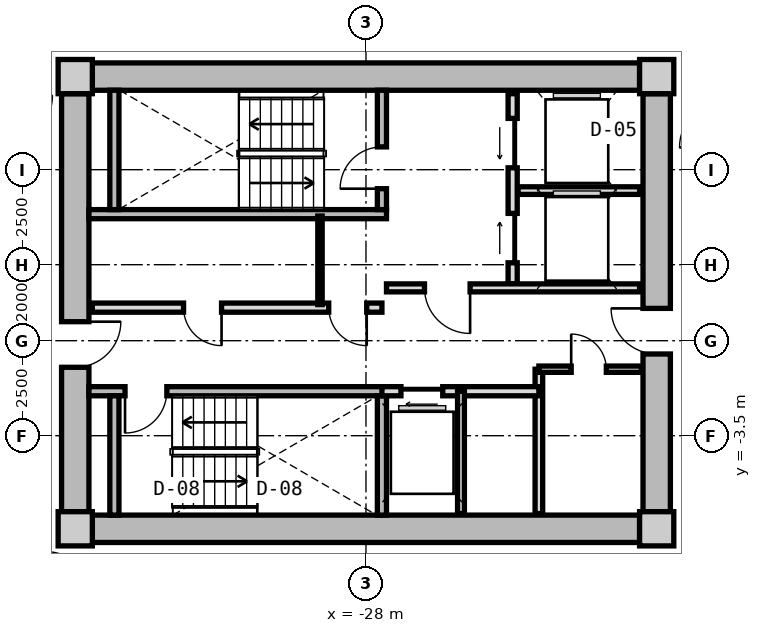
"""IFC4 building model, lengths in metres.
Left out: names, types, materials, properties, quantities, classifications, styles, units other than length and angle.
Written with IfcOpenShell. Run it as: python <this file> out.ifc"""

import sys

from ifc_helpers import new_model, si_unit, direction, frame, frame_2d, origin, origin_2d, place, context, subcontext, project, spatial, rectangle, extrude, source, transform, mapped, element, fill, save


model = new_model("IFC4")
c1 = context("Model", 3, precision=1e-05, world=origin(), true_north=direction((0.0, 1.0)))
c2 = subcontext(c1, "Body", "Model", "MODEL_VIEW")
j1 = project(units=[si_unit("LENGTHUNIT", "METRE"), si_unit("PLANEANGLEUNIT", "RADIAN")], contexts=[c1])
p1 = place(None, origin())
s1 = spatial("IfcSite", under=j1, at=p1, CompositionType="ELEMENT")
p2 = place(p1, origin())
s2 = spatial("IfcBuilding", under=s1, at=p2, CompositionType="ELEMENT")
p3 = place(p2, frame((0.0, 0.0, 102.35)))
s3 = spatial("IfcBuildingStorey", under=s2, at=p3, CompositionType="ELEMENT", Elevation=102.35)
m1 = source(origin(), c2, "Body", "SweptSolid", [
    extrude(rectangle(XDim=0.9, YDim=0.9, at=origin_2d()), origin(), (0.0, 0.0, 1.0), 3.05),
])
for number, where, z_axis, x_axis in (
    (1, (-35.65, -5.95, 0.0), (0.0, 0.0, 1.0), (1.0, 0.0, 0.0)),
    (2, (-20.35, -5.95, 0.0), (0.0, 0.0, 1.0), (1.0, 0.0, 0.0)),
    (3, (-20.35, 5.95, 0.0), (0.0, 0.0, 1.0), (1.0, 0.0, 0.0)),
    (4, (-35.65, 5.95, 0.0), (0.0, 0.0, 1.0), (1.0, 0.0, 0.0)),
):
    element("IfcColumn", number, at=place(p3, frame(where, z_axis=z_axis, x_axis=x_axis)), inside=s3, PredefinedType="COLUMN", context=c2, shape_type="MappedRepresentation", body=[
        mapped(m1, transform((0.0, 0.0, 0.0), x_axis=(1.0, 0.0, 0.0), y_axis=(0.0, 1.0, 0.0), z_axis=(0.0, 0.0, 1.0), scale=1.0)),
    ])
m2 = source(origin(), c2, "Body", "SweptSolid", [
    extrude(rectangle(XDim=14.4, YDim=0.72, at=frame_2d((7.2, 0.0))), origin(), (0.0, 0.0, 1.0), 2.79),
])
for number, where, z_axis, x_axis in (
    (5, (-35.2, 5.95, 0.0), (0.0, 0.0, 1.0), (1.0, 0.0, 0.0)),
    (6, (-20.8, -5.95, 0.0), (0.0, 0.0, 1.0), (-1.0, 0.0, 0.0)),
):
    element("IfcWall", number, at=place(p3, frame(where, z_axis=z_axis, x_axis=x_axis)), inside=s3, PredefinedType="SHEAR", context=c2, shape_type="MappedRepresentation", body=[
        mapped(m2, transform((0.0, 0.0, 0.0), x_axis=(1.0, 0.0, 0.0), y_axis=(0.0, 1.0, 0.0), z_axis=(0.0, 0.0, 1.0), scale=1.0)),
    ])
m3 = source(origin(), c2, "Body", "SweptSolid", [
    extrude(rectangle(XDim=11.0, YDim=0.72, at=frame_2d((5.5, 0.0))), origin(), (0.0, 0.0, 1.0), 2.79),
])
p4 = place(p3, frame((-35.65, -5.5, 0.0), z_axis=(0.0, 0.0, 1.0), x_axis=(0.0, 1.0, 0.0)))
e7 = element("IfcWall", 7, at=p4, inside=s3, PredefinedType="SHEAR", context=c2, shape_type="MappedRepresentation", body=[
    mapped(m3, transform((0.0, 0.0, 0.0), x_axis=(1.0, 0.0, 0.0), y_axis=(0.0, 1.0, 0.0), z_axis=(0.0, 0.0, 1.0), scale=1.0)),
])
p5 = place(p4, frame((3.8, 0.0, 0.0)))
e8 = element("IfcOpeningElement", 8, at=p5, cuts=e7, PredefinedType="OPENING", context=c2, shape_type="SweptSolid", body=[
    extrude(rectangle(XDim=1.2, YDim=2.15, at=frame_2d((0.6, 1.075))), frame((0.0, 0.37, 0.0), z_axis=(0.0, -1.0, 0.0), x_axis=(1.0, 0.0, 0.0)), (0.0, 0.0, 1.0), 0.74),
])
p6 = place(p3, frame((-20.35, 5.5, 0.0), z_axis=(0.0, 0.0, 1.0), x_axis=(0.0, -1.0, 0.0)))
e9 = element("IfcWall", 9, at=p6, inside=s3, PredefinedType="SHEAR", context=c2, shape_type="MappedRepresentation", body=[
    mapped(m3, transform((0.0, 0.0, 0.0), x_axis=(1.0, 0.0, 0.0), y_axis=(0.0, 1.0, 0.0), z_axis=(0.0, 0.0, 1.0), scale=1.0)),
])
p7 = place(p6, frame((5.65, 0.0, 0.0)))
e10 = element("IfcOpeningElement", 10, at=p7, cuts=e9, PredefinedType="OPENING", context=c2, shape_type="SweptSolid", body=[
    extrude(rectangle(XDim=1.2, YDim=2.15, at=frame_2d((0.6, 1.075))), frame((0.0, 0.37, 0.0), z_axis=(0.0, -1.0, 0.0), x_axis=(1.0, 0.0, 0.0)), (0.0, 0.0, 1.0), 0.74),
])
m4 = source(origin(), c2, "Body", "SweptSolid", [
    extrude(rectangle(XDim=7.83, YDim=0.24, at=frame_2d((3.915, 0.0))), origin(), (0.0, 0.0, 1.0), 2.79),
])
p8 = place(p3, frame((-35.29, 2.33, 0.0), z_axis=(0.0, 0.0, 1.0), x_axis=(1.0, 0.0, 0.0)))
e11 = element("IfcWall", 11, at=p8, inside=s3, PredefinedType="PARTITIONING", context=c2, shape_type="MappedRepresentation", body=[
    mapped(m4, transform((0.0, 0.0, 0.0), x_axis=(1.0, 0.0, 0.0), y_axis=(0.0, 1.0, 0.0), z_axis=(0.0, 0.0, 1.0), scale=1.0)),
])
m5 = source(origin(), c2, "Body", "SweptSolid", [
    extrude(rectangle(XDim=3.14, YDim=0.24, at=frame_2d((1.57, 0.0))), origin(), (0.0, 0.0, 1.0), 2.79),
])
p9 = place(p3, frame((-34.62, 2.45, 0.0), z_axis=(0.0, 0.0, 1.0), x_axis=(0.0, 1.0, 0.0)))
e12 = element("IfcWall", 12, at=p9, inside=s3, PredefinedType="PARTITIONING", context=c2, shape_type="MappedRepresentation", body=[
    mapped(m5, transform((0.0, 0.0, 0.0), x_axis=(1.0, 0.0, 0.0), y_axis=(0.0, 1.0, 0.0), z_axis=(0.0, 0.0, 1.0), scale=1.0)),
])
p10 = place(p3, frame((-27.58, 2.45, 0.0), z_axis=(0.0, 0.0, 1.0), x_axis=(0.0, 1.0, 0.0)))
e13 = element("IfcWall", 13, at=p10, inside=s3, PredefinedType="PARTITIONING", context=c2, shape_type="MappedRepresentation", body=[
    mapped(m5, transform((0.0, 0.0, 0.0), x_axis=(1.0, 0.0, 0.0), y_axis=(0.0, 1.0, 0.0), z_axis=(0.0, 0.0, 1.0), scale=1.0)),
])
p11 = place(p10, frame((0.55, 0.0, 0.0)))
e14 = element("IfcOpeningElement", 14, at=p11, cuts=e13, PredefinedType="OPENING", context=c2, shape_type="SweptSolid", body=[
    extrude(rectangle(XDim=1.1, YDim=2.15, at=frame_2d((0.55, 1.075))), frame((0.0, 0.13, 0.0), z_axis=(0.0, -1.0, 0.0), x_axis=(1.0, 0.0, 0.0)), (0.0, 0.0, 1.0), 0.26),
])
p12 = place(p3, frame((-35.29, -2.33, 0.0), z_axis=(0.0, 0.0, 1.0), x_axis=(1.0, 0.0, 0.0)))
e15 = element("IfcWall", 15, at=p12, inside=s3, PredefinedType="PARTITIONING", context=c2, shape_type="MappedRepresentation", body=[
    mapped(m4, transform((0.0, 0.0, 0.0), x_axis=(1.0, 0.0, 0.0), y_axis=(0.0, 1.0, 0.0), z_axis=(0.0, 0.0, 1.0), scale=1.0)),
])
p13 = place(p12, frame((0.95, 0.0, 0.0)))
e16 = element("IfcOpeningElement", 16, at=p13, cuts=e15, PredefinedType="OPENING", context=c2, shape_type="SweptSolid", body=[
    extrude(rectangle(XDim=1.1, YDim=2.15, at=frame_2d((0.55, 1.075))), frame((0.0, 0.13, 0.0), z_axis=(0.0, -1.0, 0.0), x_axis=(1.0, 0.0, 0.0)), (0.0, 0.0, 1.0), 0.26),
])
for number, where, z_axis, x_axis in (
    (17, (-34.62, -5.59, 0.0), (0.0, 0.0, 1.0), (0.0, 1.0, 0.0)),
    (18, (-27.58, -5.59, 0.0), (0.0, 0.0, 1.0), (0.0, 1.0, 0.0)),
):
    element("IfcWall", number, at=place(p3, frame(where, z_axis=z_axis, x_axis=x_axis)), inside=s3, PredefinedType="PARTITIONING", context=c2, shape_type="MappedRepresentation", body=[
        mapped(m5, transform((0.0, 0.0, 0.0), x_axis=(1.0, 0.0, 0.0), y_axis=(0.0, 1.0, 0.0), z_axis=(0.0, 0.0, 1.0), scale=1.0)),
    ])
m6 = source(origin(), c2, "Body", "SweptSolid", [
    extrude(rectangle(XDim=5.0, YDim=0.24, at=frame_2d((2.5, 0.0))), origin(), (0.0, 0.0, 1.0), 2.775),
])
p14 = place(p3, frame((-24.14, 0.5, 0.0), z_axis=(0.0, 0.0, 1.0), x_axis=(0.0, 1.0, 0.0)))
e19 = element("IfcWall", 19, at=p14, inside=s3, PredefinedType="PARTITIONING", context=c2, shape_type="MappedRepresentation", body=[
    mapped(m6, transform((0.0, 0.0, 0.0), x_axis=(1.0, 0.0, 0.0), y_axis=(0.0, 1.0, 0.0), z_axis=(0.0, 0.0, 1.0), scale=1.0)),
])
p15 = place(p14, frame((3.05, 0.0, 0.0)))
e20 = element("IfcOpeningElement", 20, at=p15, cuts=e19, PredefinedType="OPENING", context=c2, shape_type="SweptSolid", body=[
    extrude(rectangle(XDim=1.3, YDim=2.2, at=frame_2d((0.65, 1.1))), frame((0.0, 0.13, 0.0), z_axis=(0.0, -1.0, 0.0), x_axis=(1.0, 0.0, 0.0)), (0.0, 0.0, 1.0), 0.26),
])
p16 = place(p14, frame((0.55, 0.0, 0.0)))
e21 = element("IfcOpeningElement", 21, at=p16, cuts=e19, PredefinedType="OPENING", context=c2, shape_type="SweptSolid", body=[
    extrude(rectangle(XDim=1.3, YDim=2.2, at=frame_2d((0.65, 1.1))), frame((0.0, 0.13, 0.0), z_axis=(0.0, -1.0, 0.0), x_axis=(1.0, 0.0, 0.0)), (0.0, 0.0, 1.0), 0.26),
])
m7 = source(origin(), c2, "Body", "SweptSolid", [
    extrude(rectangle(XDim=3.2, YDim=0.2, at=frame_2d((1.6, 0.0))), origin(), (0.0, 0.0, 1.0), 2.775),
])
p17 = place(p3, frame((-24.0, 2.95, 0.0), z_axis=(0.0, 0.0, 1.0), x_axis=(1.0, 0.0, 0.0)))
e22 = element("IfcWall", 22, at=p17, inside=s3, PredefinedType="PARTITIONING", context=c2, shape_type="MappedRepresentation", body=[
    mapped(m7, transform((0.0, 0.0, 0.0), x_axis=(1.0, 0.0, 0.0), y_axis=(0.0, 1.0, 0.0), z_axis=(0.0, 0.0, 1.0), scale=1.0)),
])
m8 = source(origin(), c2, "Body", "SweptSolid", [
    extrude(rectangle(XDim=6.66, YDim=0.21, at=frame_2d((3.33, 0.0))), origin(), (0.0, 0.0, 1.0), 2.775),
])
p18 = place(p3, frame((-27.46, 0.39, 0.0), z_axis=(0.0, 0.0, 1.0), x_axis=(1.0, 0.0, 0.0)))
e23 = element("IfcWall", 23, at=p18, inside=s3, PredefinedType="PARTITIONING", context=c2, shape_type="MappedRepresentation", body=[
    mapped(m8, transform((0.0, 0.0, 0.0), x_axis=(1.0, 0.0, 0.0), y_axis=(0.0, 1.0, 0.0), z_axis=(0.0, 0.0, 1.0), scale=1.0)),
])
p19 = place(p18, frame((1.0, 0.0, 0.0)))
e24 = element("IfcOpeningElement", 24, at=p19, cuts=e23, PredefinedType="OPENING", context=c2, shape_type="SweptSolid", body=[
    extrude(rectangle(XDim=1.2, YDim=2.15, at=frame_2d((0.6, 1.075))), frame((0.0, 0.115, 0.0), z_axis=(0.0, -1.0, 0.0), x_axis=(1.0, 0.0, 0.0)), (0.0, 0.0, 1.0), 0.23),
])
m9 = source(origin(), c2, "Body", "SweptSolid", [
    extrude(rectangle(XDim=7.62, YDim=0.24, at=frame_2d((3.81, 0.0))), origin(), (0.0, 0.0, 1.0), 2.775),
])
p20 = place(p3, frame((-35.2, -0.13, 0.0), z_axis=(0.0, 0.0, 1.0), x_axis=(1.0, 0.0, 0.0)))
e25 = element("IfcWall", 25, at=p20, inside=s3, PredefinedType="PARTITIONING", context=c2, shape_type="MappedRepresentation", body=[
    mapped(m9, transform((0.0, 0.0, 0.0), x_axis=(1.0, 0.0, 0.0), y_axis=(0.0, 1.0, 0.0), z_axis=(0.0, 0.0, 1.0), scale=1.0)),
])
p21 = place(p20, frame((6.22, 0.0, 0.0)))
e26 = element("IfcOpeningElement", 26, at=p21, cuts=e25, PredefinedType="OPENING", context=c2, shape_type="SweptSolid", body=[
    extrude(rectangle(XDim=1.0, YDim=2.1, at=frame_2d((0.5, 1.05))), frame((0.0, 0.13, 0.0), z_axis=(0.0, -1.0, 0.0), x_axis=(1.0, 0.0, 0.0)), (0.0, 0.0, 1.0), 0.26),
])
p22 = place(p20, frame((2.4, 0.0, 0.0)))
e27 = element("IfcOpeningElement", 27, at=p22, cuts=e25, PredefinedType="OPENING", context=c2, shape_type="SweptSolid", body=[
    extrude(rectangle(XDim=1.0, YDim=2.1, at=frame_2d((0.5, 1.05))), frame((0.0, 0.13, 0.0), z_axis=(0.0, -1.0, 0.0), x_axis=(1.0, 0.0, 0.0)), (0.0, 0.0, 1.0), 0.26),
])
m10 = source(origin(), c2, "Body", "SweptSolid", [
    extrude(rectangle(XDim=2.33, YDim=0.115, at=frame_2d((1.165, 0.0))), origin(), (0.0, 0.0, 1.0), 2.775),
])
p23 = place(p3, frame((-29.21, -0.05, 0.0), z_axis=(0.0, 0.0, 1.0), x_axis=(0.0, 1.0, 0.0)))
e28 = element("IfcWall", 28, at=p23, inside=s3, PredefinedType="PARTITIONING", context=c2, shape_type="MappedRepresentation", body=[
    mapped(m10, transform((0.0, 0.0, 0.0), x_axis=(1.0, 0.0, 0.0), y_axis=(0.0, 1.0, 0.0), z_axis=(0.0, 0.0, 1.0), scale=1.0)),
])
m11 = source(origin(), c2, "Body", "SweptSolid", [
    extrude(rectangle(XDim=3.8, YDim=0.2, at=frame_2d((1.9, 0.0))), origin(), (0.0, 0.0, 1.0), 2.775),
])
p24 = place(p3, frame((-23.45, -5.55, 0.0), z_axis=(0.0, 0.0, 1.0), x_axis=(0.0, 1.0, 0.0)))
e29 = element("IfcWall", 29, at=p24, inside=s3, PredefinedType="PARTITIONING", context=c2, shape_type="MappedRepresentation", body=[
    mapped(m11, transform((0.0, 0.0, 0.0), x_axis=(1.0, 0.0, 0.0), y_axis=(0.0, 1.0, 0.0), z_axis=(0.0, 0.0, 1.0), scale=1.0)),
])
m12 = source(origin(), c2, "Body", "SweptSolid", [
    extrude(rectangle(XDim=4.13, YDim=0.24, at=frame_2d((2.065, 0.0))), origin(), (0.0, 0.0, 1.0), 2.775),
])
p25 = place(p3, frame((-27.58, -2.33, 0.0), z_axis=(0.0, 0.0, 1.0), x_axis=(1.0, 0.0, 0.0)))
e30 = element("IfcWall", 30, at=p25, inside=s3, PredefinedType="PARTITIONING", context=c2, shape_type="MappedRepresentation", body=[
    mapped(m12, transform((0.0, 0.0, 0.0), x_axis=(1.0, 0.0, 0.0), y_axis=(0.0, 1.0, 0.0), z_axis=(0.0, 0.0, 1.0), scale=1.0)),
])
p26 = place(p25, frame((0.5, 0.0, 0.0)))
e31 = element("IfcOpeningElement", 31, at=p26, cuts=e30, PredefinedType="OPENING", context=c2, shape_type="SweptSolid", body=[
    extrude(rectangle(XDim=1.1, YDim=2.2, at=frame_2d((0.55, 1.1))), frame((0.0, 0.13, 0.0), z_axis=(0.0, -1.0, 0.0), x_axis=(1.0, 0.0, 0.0)), (0.0, 0.0, 1.0), 0.26),
])
m13 = source(origin(), c2, "Body", "SweptSolid", [
    extrude(rectangle(XDim=3.22, YDim=0.18, at=frame_2d((1.61, 0.0))), origin(), (0.0, 0.0, 1.0), 2.775),
])
p27 = place(p3, frame((-25.5, -5.55, 0.0), z_axis=(0.0, 0.0, 1.0), x_axis=(0.0, 1.0, 0.0)))
e32 = element("IfcWall", 32, at=p27, inside=s3, PredefinedType="PARTITIONING", context=c2, shape_type="MappedRepresentation", body=[
    mapped(m13, transform((0.0, 0.0, 0.0), x_axis=(1.0, 0.0, 0.0), y_axis=(0.0, 1.0, 0.0), z_axis=(0.0, 0.0, 1.0), scale=1.0)),
])
m14 = source(origin(), c2, "Body", "SweptSolid", [
    extrude(rectangle(XDim=2.7, YDim=0.165, at=frame_2d((1.35, 0.0))), origin(), (0.0, 0.0, 1.0), 2.775),
])
p28 = place(p3, frame((-23.45, -1.75, 0.0), z_axis=(0.0, 0.0, 1.0), x_axis=(1.0, 0.0, 0.0)))
e33 = element("IfcWall", 33, at=p28, inside=s3, PredefinedType="PARTITIONING", context=c2, shape_type="MappedRepresentation", body=[
    mapped(m14, transform((0.0, 0.0, 0.0), x_axis=(1.0, 0.0, 0.0), y_axis=(0.0, 1.0, 0.0), z_axis=(0.0, 0.0, 1.0), scale=1.0)),
])
p29 = place(p28, frame((0.85, 0.0, 0.0)))
e34 = element("IfcOpeningElement", 34, at=p29, cuts=e33, PredefinedType="OPENING", context=c2, shape_type="SweptSolid", body=[
    extrude(rectangle(XDim=0.925, YDim=2.1, at=frame_2d((0.462, 1.05))), frame((0.0, 0.093, 0.0), z_axis=(0.0, -1.0, 0.0), x_axis=(1.0, 0.0, 0.0)), (0.0, 0.0, 1.0), 0.185),
])
m15 = source(origin(), c2, "Body", "SweptSolid", [
    extrude(rectangle(XDim=1.1, YDim=2.15, at=frame_2d((0.55, 1.075))), frame((0.0, 0.025, 0.0), z_axis=(0.0, -1.0, 0.0), x_axis=(1.0, 0.0, 0.0)), (0.0, 0.0, 1.0), 0.05),
])
p30 = place(p11, origin())
e35 = element("IfcDoor", 35, at=p30, inside=s3, OperationType="SINGLE_SWING_LEFT", PredefinedType="DOOR", context=c2, shape_type="MappedRepresentation", body=[
    mapped(m15, transform((0.0, 0.0, 0.0), x_axis=(1.0, 0.0, 0.0), y_axis=(0.0, 1.0, 0.0), z_axis=(0.0, 0.0, 1.0), scale=1.0)),
])
fill(e14, e35)
p31 = place(p13, frame((1.1, 0.0, 0.0), z_axis=(0.0, 0.0, 1.0), x_axis=(-1.0, 0.0, 0.0)))
e36 = element("IfcDoor", 36, at=p31, inside=s3, OperationType="SINGLE_SWING_RIGHT", PredefinedType="DOOR", context=c2, shape_type="MappedRepresentation", body=[
    mapped(m15, transform((0.0, 0.0, 0.0), x_axis=(1.0, 0.0, 0.0), y_axis=(0.0, 1.0, 0.0), z_axis=(0.0, 0.0, 1.0), scale=1.0)),
])
fill(e16, e36)
m16 = source(origin(), c2, "Body", "SweptSolid", [
    extrude(rectangle(XDim=1.3, YDim=2.2, at=frame_2d((0.65, 1.1))), frame((0.0, 0.025, 0.0), z_axis=(0.0, -1.0, 0.0), x_axis=(1.0, 0.0, 0.0)), (0.0, 0.0, 1.0), 0.05),
])
p32 = place(p15, origin())
e37 = element("IfcDoor", 37, at=p32, inside=s3, OperationType="SLIDING_TO_LEFT", PredefinedType="DOOR", context=c2, shape_type="MappedRepresentation", body=[
    mapped(m16, transform((0.0, 0.0, 0.0), x_axis=(1.0, 0.0, 0.0), y_axis=(0.0, 1.0, 0.0), z_axis=(0.0, 0.0, 1.0), scale=1.0)),
])
fill(e20, e37)
p33 = place(p16, origin())
e38 = element("IfcDoor", 38, at=p33, inside=s3, OperationType="SLIDING_TO_RIGHT", PredefinedType="DOOR", context=c2, shape_type="MappedRepresentation", body=[
    mapped(m16, transform((0.0, 0.0, 0.0), x_axis=(1.0, 0.0, 0.0), y_axis=(0.0, 1.0, 0.0), z_axis=(0.0, 0.0, 1.0), scale=1.0)),
])
fill(e21, e38)
m17 = source(origin(), c2, "Body", "SweptSolid", [
    extrude(rectangle(XDim=1.2, YDim=2.15, at=frame_2d((0.6, 1.075))), frame((0.0, 0.025, 0.0), z_axis=(0.0, -1.0, 0.0), x_axis=(1.0, 0.0, 0.0)), (0.0, 0.0, 1.0), 0.05),
])
p34 = place(p19, frame((1.2, 0.0, 0.0), z_axis=(0.0, 0.0, 1.0), x_axis=(-1.0, 0.0, 0.0)))
e39 = element("IfcDoor", 39, at=p34, inside=s3, OperationType="SINGLE_SWING_LEFT", PredefinedType="DOOR", context=c2, shape_type="MappedRepresentation", body=[
    mapped(m17, transform((0.0, 0.0, 0.0), x_axis=(1.0, 0.0, 0.0), y_axis=(0.0, 1.0, 0.0), z_axis=(0.0, 0.0, 1.0), scale=1.0)),
])
fill(e24, e39)
p35 = place(p5, frame((1.2, 0.0, 0.0), z_axis=(0.0, 0.0, 1.0), x_axis=(-1.0, 0.0, 0.0)))
e40 = element("IfcDoor", 40, at=p35, inside=s3, OperationType="SINGLE_SWING_LEFT", PredefinedType="DOOR", context=c2, shape_type="MappedRepresentation", body=[
    mapped(m17, transform((0.0, 0.0, 0.0), x_axis=(1.0, 0.0, 0.0), y_axis=(0.0, 1.0, 0.0), z_axis=(0.0, 0.0, 1.0), scale=1.0)),
])
fill(e8, e40)
p36 = place(p7, frame((1.2, 0.0, 0.0), z_axis=(0.0, 0.0, 1.0), x_axis=(-1.0, 0.0, 0.0)))
e41 = element("IfcDoor", 41, at=p36, inside=s3, OperationType="SINGLE_SWING_RIGHT", PredefinedType="DOOR", context=c2, shape_type="MappedRepresentation", body=[
    mapped(m17, transform((0.0, 0.0, 0.0), x_axis=(1.0, 0.0, 0.0), y_axis=(0.0, 1.0, 0.0), z_axis=(0.0, 0.0, 1.0), scale=1.0)),
])
fill(e10, e41)
m18 = source(origin(), c2, "Body", "SweptSolid", [
    extrude(rectangle(XDim=1.0, YDim=2.1, at=frame_2d((0.5, 1.05))), frame((0.0, 0.025, 0.0), z_axis=(0.0, -1.0, 0.0), x_axis=(1.0, 0.0, 0.0)), (0.0, 0.0, 1.0), 0.05),
])
p37 = place(p21, frame((1.0, 0.0, 0.0), z_axis=(0.0, 0.0, 1.0), x_axis=(-1.0, 0.0, 0.0)))
e42 = element("IfcDoor", 42, at=p37, inside=s3, OperationType="SINGLE_SWING_LEFT", PredefinedType="DOOR", context=c2, shape_type="MappedRepresentation", body=[
    mapped(m18, transform((0.0, 0.0, 0.0), x_axis=(1.0, 0.0, 0.0), y_axis=(0.0, 1.0, 0.0), z_axis=(0.0, 0.0, 1.0), scale=1.0)),
])
fill(e26, e42)
p38 = place(p22, frame((1.0, 0.0, 0.0), z_axis=(0.0, 0.0, 1.0), x_axis=(-1.0, 0.0, 0.0)))
e43 = element("IfcDoor", 43, at=p38, inside=s3, OperationType="SINGLE_SWING_LEFT", PredefinedType="DOOR", context=c2, shape_type="MappedRepresentation", body=[
    mapped(m18, transform((0.0, 0.0, 0.0), x_axis=(1.0, 0.0, 0.0), y_axis=(0.0, 1.0, 0.0), z_axis=(0.0, 0.0, 1.0), scale=1.0)),
])
fill(e27, e43)
m19 = source(origin(), c2, "Body", "SweptSolid", [
    extrude(rectangle(XDim=1.1, YDim=2.2, at=frame_2d((0.55, 1.1))), frame((0.0, 0.025, 0.0), z_axis=(0.0, -1.0, 0.0), x_axis=(1.0, 0.0, 0.0)), (0.0, 0.0, 1.0), 0.05),
])
p39 = place(p26, frame((1.1, 0.0, 0.0), z_axis=(0.0, 0.0, 1.0), x_axis=(-1.0, 0.0, 0.0)))
e44 = element("IfcDoor", 44, at=p39, inside=s3, OperationType="SLIDING_TO_LEFT", PredefinedType="DOOR", context=c2, shape_type="MappedRepresentation", body=[
    mapped(m19, transform((0.0, 0.0, 0.0), x_axis=(1.0, 0.0, 0.0), y_axis=(0.0, 1.0, 0.0), z_axis=(0.0, 0.0, 1.0), scale=1.0)),
])
fill(e31, e44)
m20 = source(origin(), c2, "Body", "SweptSolid", [
    extrude(rectangle(XDim=0.925, YDim=2.1, at=frame_2d((0.462, 1.05))), frame((0.0, 0.025, 0.0), z_axis=(0.0, -1.0, 0.0), x_axis=(1.0, 0.0, 0.0)), (0.0, 0.0, 1.0), 0.05),
])
p40 = place(p29, origin())
e45 = element("IfcDoor", 45, at=p40, inside=s3, OperationType="SINGLE_SWING_LEFT", PredefinedType="DOOR", context=c2, shape_type="MappedRepresentation", body=[
    mapped(m20, transform((0.0, 0.0, 0.0), x_axis=(1.0, 0.0, 0.0), y_axis=(0.0, 1.0, 0.0), z_axis=(0.0, 0.0, 1.0), scale=1.0)),
])
fill(e34, e45)
save(model, sys.argv[1])
